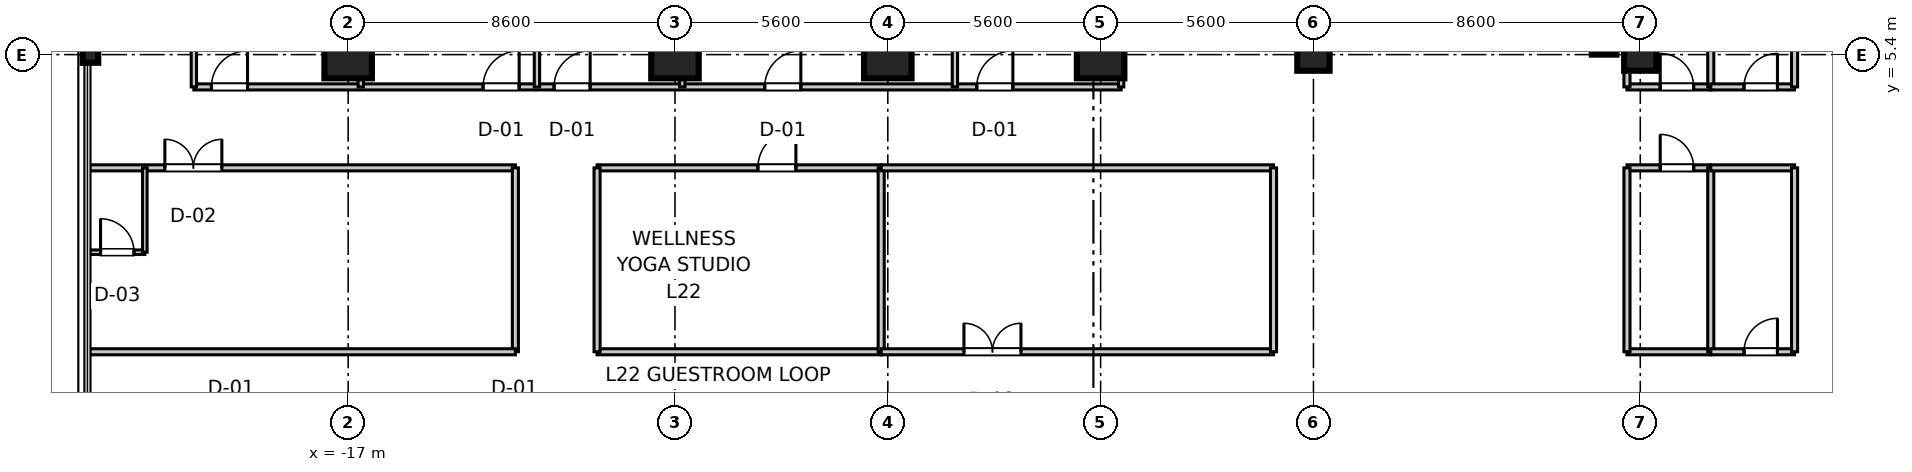
"""IFC4 building model, lengths in metres.
Left out: names, types, materials, properties, quantities, classifications, styles, units other than length and angle.
Written with IfcOpenShell. Run it as: python <this file> out.ifc"""

import sys

from ifc_helpers import new_model, si_unit, direction, frame, frame_2d, origin, origin_2d, place, context, subcontext, project, spatial, rectangle, i_section, extrude, source, transform, mapped, element, fill, save


model = new_model("IFC4")
c1 = context("Model", 3, precision=1e-05, world=origin(), true_north=direction((0.0, 1.0)))
c2 = subcontext(c1, "Body", "Model", "MODEL_VIEW")
j1 = project(units=[si_unit("LENGTHUNIT", "METRE"), si_unit("PLANEANGLEUNIT", "RADIAN")], contexts=[c1])
p1 = place(None, origin())
s1 = spatial("IfcSite", under=j1, at=p1, CompositionType="ELEMENT")
p2 = place(p1, origin())
s2 = spatial("IfcBuilding", under=s1, at=p2, CompositionType="ELEMENT")
p3 = place(p2, frame((0.0, 0.0, 91.95)))
s3 = spatial("IfcBuildingStorey", under=s2, at=p3, CompositionType="ELEMENT", Elevation=91.95)
m1 = source(origin(), c2, "Body", "SweptSolid", [
    extrude(rectangle(XDim=1.25, YDim=1.25, at=origin_2d()), origin(), (0.0, 0.0, 1.0), 3.605),
])
for number, where, z_axis, x_axis in (
    (1, (-17.0, 5.4, 0.0), (0.0, 0.0, 1.0), (1.0, 0.0, 0.0)),
    (2, (-8.4, 5.4, 0.0), (0.0, 0.0, 1.0), (1.0, 0.0, 0.0)),
    (3, (-2.8, 5.4, 0.0), (0.0, 0.0, 1.0), (1.0, 0.0, 0.0)),
    (4, (2.8, 5.4, 0.0), (0.0, 0.0, 1.0), (1.0, 0.0, 0.0)),
):
    element("IfcColumn", number, at=place(p3, frame(where, z_axis=z_axis, x_axis=x_axis)), inside=s3, PredefinedType="COLUMN", context=c2, shape_type="MappedRepresentation", body=[
        mapped(m1, transform((0.0, 0.0, 0.0), scale=1.0)),
    ])
m2 = source(origin(), c2, "Body", "SweptSolid", [
    extrude(rectangle(XDim=0.85, YDim=0.85, at=origin_2d()), origin(), (0.0, 0.0, 1.0), 3.605),
])
for number, where, z_axis, x_axis in (
    (5, (8.4, 5.4, 0.0), (0.0, 0.0, 1.0), (1.0, 0.0, 0.0)),
    (6, (17.0, 5.4, 0.0), (0.0, 0.0, 1.0), (1.0, 0.0, 0.0)),
):
    element("IfcColumn", number, at=place(p3, frame(where, z_axis=z_axis, x_axis=x_axis)), inside=s3, PredefinedType="PILASTER", context=c2, shape_type="MappedRepresentation", body=[
        mapped(m2, transform((0.0, 0.0, 0.0), scale=1.0)),
    ])
m3 = source(origin(), c2, "Body", "SweptSolid", [
    extrude(i_section(OverallWidth=0.409, OverallDepth=0.43, WebThickness=0.021, FlangeThickness=0.034, at=origin_2d()), origin(), (0.0, 0.0, 1.0), 3.605),
])
p4 = place(p3, frame((-23.78, 5.4, 0.0), z_axis=(0.0, 0.0, 1.0), x_axis=(1.0, 0.0, 0.0)))
e7 = element("IfcColumn", 7, at=p4, inside=s3, PredefinedType="COLUMN", context=c2, shape_type="MappedRepresentation", body=[
    mapped(m3, transform((0.0, 0.0, 0.0), scale=1.0)),
])
m4 = source(origin(), c2, "Body", "SweptSolid", [
    extrude(rectangle(XDim=11.6, YDim=0.65, at=frame_2d((5.8, 0.0))), origin(), (0.0, 0.0, 1.0), 3.38),
])
p5 = place(p3, frame((16.05, 5.4, 0.0), z_axis=(0.0, 0.0, 1.0), x_axis=(0.0, 1.0, 0.0)))
e8 = element("IfcWall", 8, at=p5, inside=s3, PredefinedType="SHEAR", context=c2, shape_type="MappedRepresentation", body=[
    mapped(m4, transform((0.0, 0.0, 0.0), scale=1.0)),
])
m5 = source(origin(), c2, "Body", "SweptSolid", [
    extrude(rectangle(XDim=2.205, YDim=0.16, at=frame_2d((1.103, 0.0))), origin(), (0.0, 0.0, 1.0), 2.72),
])
p6 = place(p3, frame((16.65, 4.55, 0.0), z_axis=(0.0, 0.0, 1.0), x_axis=(1.0, 0.0, 0.0)))
e9 = element("IfcWall", 9, at=p6, inside=s3, PredefinedType="PARTITIONING", context=c2, shape_type="MappedRepresentation", body=[
    mapped(m5, transform((0.0, 0.0, 0.0), scale=1.0)),
])
p7 = place(p6, frame((0.875, 0.0, 0.0)))
e10 = element("IfcOpeningElement", 10, at=p7, cuts=e9, PredefinedType="OPENING", context=c2, shape_type="SweptSolid", body=[
    extrude(rectangle(XDim=0.88, YDim=2.1, at=frame_2d((0.44, 1.05))), frame((0.0, 0.09, 0.0), z_axis=(0.0, -1.0, 0.0), x_axis=(1.0, 0.0, 0.0)), (0.0, 0.0, 1.0), 0.18),
])
m6 = source(origin(), c2, "Body", "SweptSolid", [
    extrude(rectangle(XDim=19.25, YDim=0.16, at=frame_2d((9.625, 0.0))), origin(), (0.0, 0.0, 1.0), 2.72),
])
for number, where, z_axis, x_axis in (
    (11, (16.65, 4.55, 0.0), (0.0, 0.0, 1.0), (0.0, 1.0, 0.0)),
    (12, (18.855, 4.55, 0.0), (0.0, 0.0, 1.0), (0.0, 1.0, 0.0)),
):
    element("IfcWall", number, at=place(p3, frame(where, z_axis=z_axis, x_axis=x_axis)), inside=s3, PredefinedType="PARTITIONING", context=c2, shape_type="MappedRepresentation", body=[
        mapped(m6, transform((0.0, 0.0, 0.0), scale=1.0)),
    ])
p8 = place(p3, frame((18.855, 4.55, 0.0), z_axis=(0.0, 0.0, 1.0), x_axis=(1.0, 0.0, 0.0)))
e13 = element("IfcWall", 13, at=p8, inside=s3, PredefinedType="PARTITIONING", context=c2, shape_type="MappedRepresentation", body=[
    mapped(m5, transform((0.0, 0.0, 0.0), scale=1.0)),
])
p9 = place(p8, frame((0.875, 0.0, 0.0)))
e14 = element("IfcOpeningElement", 14, at=p9, cuts=e13, PredefinedType="OPENING", context=c2, shape_type="SweptSolid", body=[
    extrude(rectangle(XDim=0.88, YDim=2.1, at=frame_2d((0.44, 1.05))), frame((0.0, 0.09, 0.0), z_axis=(0.0, -1.0, 0.0), x_axis=(1.0, 0.0, 0.0)), (0.0, 0.0, 1.0), 0.18),
])
m7 = source(origin(), c2, "Body", "SweptSolid", [
    extrude(rectangle(XDim=17.83, YDim=0.16, at=frame_2d((8.915, 0.0))), origin(), (0.0, 0.0, 1.0), 2.72),
])
p10 = place(p3, frame((21.06, 4.55, 0.0), z_axis=(0.0, 0.0, 1.0), x_axis=(0.0, 1.0, 0.0)))
e15 = element("IfcWall", 15, at=p10, inside=s3, PredefinedType="PARTITIONING", context=c2, shape_type="MappedRepresentation", body=[
    mapped(m7, transform((0.0, 0.0, 0.0), scale=1.0)),
])
m8 = source(origin(), c2, "Body", "SweptSolid", [
    extrude(rectangle(XDim=24.4, YDim=0.16, at=frame_2d((12.2, 0.0))), origin(), (0.0, 0.0, 1.0), 2.72),
])
p11 = place(p3, frame((-21.06, 4.55, 0.0), z_axis=(0.0, 0.0, 1.0), x_axis=(1.0, 0.0, 0.0)))
e16 = element("IfcWall", 16, at=p11, inside=s3, PredefinedType="PARTITIONING", context=c2, shape_type="MappedRepresentation", body=[
    mapped(m8, transform((0.0, 0.0, 0.0), scale=1.0)),
])
p12 = place(p11, frame((0.462, 0.0, 0.0)))
e17 = element("IfcOpeningElement", 17, at=p12, cuts=e16, PredefinedType="OPENING", context=c2, shape_type="SweptSolid", body=[
    extrude(rectangle(XDim=0.95, YDim=2.1, at=frame_2d((0.475, 1.05))), frame((0.0, 0.09, 0.0), z_axis=(0.0, -1.0, 0.0), x_axis=(1.0, 0.0, 0.0)), (0.0, 0.0, 1.0), 0.18),
])
p13 = place(p11, frame((7.61, 0.0, 0.0)))
e18 = element("IfcOpeningElement", 18, at=p13, cuts=e16, PredefinedType="OPENING", context=c2, shape_type="SweptSolid", body=[
    extrude(rectangle(XDim=0.95, YDim=2.1, at=frame_2d((0.475, 1.05))), frame((0.0, 0.09, 0.0), z_axis=(0.0, -1.0, 0.0), x_axis=(1.0, 0.0, 0.0)), (0.0, 0.0, 1.0), 0.18),
])
p14 = place(p11, frame((9.478, 0.0, 0.0)))
e19 = element("IfcOpeningElement", 19, at=p14, cuts=e16, PredefinedType="OPENING", context=c2, shape_type="SweptSolid", body=[
    extrude(rectangle(XDim=0.95, YDim=2.1, at=frame_2d((0.475, 1.05))), frame((0.0, 0.09, 0.0), z_axis=(0.0, -1.0, 0.0), x_axis=(1.0, 0.0, 0.0)), (0.0, 0.0, 1.0), 0.18),
])
p15 = place(p11, frame((15.022, 0.0, 0.0)))
e20 = element("IfcOpeningElement", 20, at=p15, cuts=e16, PredefinedType="OPENING", context=c2, shape_type="SweptSolid", body=[
    extrude(rectangle(XDim=0.95, YDim=2.1, at=frame_2d((0.475, 1.05))), frame((0.0, 0.09, 0.0), z_axis=(0.0, -1.0, 0.0), x_axis=(1.0, 0.0, 0.0)), (0.0, 0.0, 1.0), 0.18),
])
p16 = place(p11, frame((20.601, 0.0, 0.0)))
e21 = element("IfcOpeningElement", 21, at=p16, cuts=e16, PredefinedType="OPENING", context=c2, shape_type="SweptSolid", body=[
    extrude(rectangle(XDim=0.95, YDim=2.1, at=frame_2d((0.475, 1.05))), frame((0.0, 0.09, 0.0), z_axis=(0.0, -1.0, 0.0), x_axis=(1.0, 0.0, 0.0)), (0.0, 0.0, 1.0), 0.18),
])
m9 = source(origin(), c2, "Body", "SweptSolid", [
    extrude(rectangle(XDim=17.83, YDim=0.14, at=frame_2d((8.915, 0.0))), origin(), (0.0, 0.0, 1.0), 2.72),
])
p17 = place(p3, frame((-21.06, 4.55, 0.0), z_axis=(0.0, 0.0, 1.0), x_axis=(0.0, 1.0, 0.0)))
e22 = element("IfcWall", 22, at=p17, inside=s3, PredefinedType="PARTITIONING", context=c2, shape_type="MappedRepresentation", body=[
    mapped(m9, transform((0.0, 0.0, 0.0), scale=1.0)),
])
m10 = source(origin(), c2, "Body", "SweptSolid", [
    extrude(rectangle(XDim=19.25, YDim=0.14, at=frame_2d((9.625, 0.0))), origin(), (0.0, 0.0, 1.0), 2.72),
])
for number, where, z_axis, x_axis in (
    (23, (3.34, 4.55, 0.0), (0.0, 0.0, 1.0), (0.0, 1.0, 0.0)),
    (24, (-16.668, 4.55, 0.0), (0.0, 0.0, 1.0), (0.0, 1.0, 0.0)),
    (25, (-12.032, 4.55, 0.0), (0.0, 0.0, 1.0), (0.0, 1.0, 0.0)),
    (26, (-8.208, 4.55, 0.0), (0.0, 0.0, 1.0), (0.0, 1.0, 0.0)),
    (27, (-1.034, 4.55, 0.0), (0.0, 0.0, 1.0), (0.0, 1.0, 0.0)),
):
    element("IfcWall", number, at=place(p3, frame(where, z_axis=z_axis, x_axis=x_axis)), inside=s3, PredefinedType="PARTITIONING", context=c2, shape_type="MappedRepresentation", body=[
        mapped(m10, transform((0.0, 0.0, 0.0), scale=1.0)),
    ])
m11 = source(origin(), c2, "Body", "SweptSolid", [
    extrude(rectangle(XDim=11.2, YDim=0.16, at=frame_2d((5.6, 0.0))), origin(), (0.0, 0.0, 1.0), 2.72),
])
p18 = place(p3, frame((-23.8, 2.42, 0.0), z_axis=(0.0, 0.0, 1.0), x_axis=(1.0, 0.0, 0.0)))
e28 = element("IfcWall", 28, at=p18, inside=s3, PredefinedType="PARTITIONING", context=c2, shape_type="MappedRepresentation", body=[
    mapped(m11, transform((0.0, 0.0, 0.0), scale=1.0)),
])
p19 = place(p18, frame((1.977, 0.0, 0.0)))
e29 = element("IfcOpeningElement", 29, at=p19, cuts=e28, PredefinedType="OPENING", context=c2, shape_type="SweptSolid", body=[
    extrude(rectangle(XDim=1.5, YDim=2.15, at=frame_2d((0.75, 1.075))), frame((0.0, 0.09, 0.0), z_axis=(0.0, -1.0, 0.0), x_axis=(1.0, 0.0, 0.0)), (0.0, 0.0, 1.0), 0.18),
])
m12 = source(origin(), c2, "Body", "SweptSolid", [
    extrude(rectangle(XDim=4.84, YDim=0.16, at=frame_2d((2.42, 0.0))), origin(), (0.0, 0.0, 1.0), 2.72),
])
p20 = place(p3, frame((-12.6, -2.42, 0.0), z_axis=(0.0, 0.0, 1.0), x_axis=(0.0, 1.0, 0.0)))
e30 = element("IfcWall", 30, at=p20, inside=s3, PredefinedType="PARTITIONING", context=c2, shape_type="MappedRepresentation", body=[
    mapped(m12, transform((0.0, 0.0, 0.0), scale=1.0)),
])
p21 = place(p3, frame((-23.8, -2.42, 0.0), z_axis=(0.0, 0.0, 1.0), x_axis=(1.0, 0.0, 0.0)))
e31 = element("IfcWall", 31, at=p21, inside=s3, PredefinedType="PARTITIONING", context=c2, shape_type="MappedRepresentation", body=[
    mapped(m11, transform((0.0, 0.0, 0.0), scale=1.0)),
])
m13 = source(origin(), c2, "Body", "SweptSolid", [
    extrude(rectangle(XDim=1.45, YDim=0.12, at=frame_2d((0.725, 0.0))), origin(), (0.0, 0.0, 1.0), 2.72),
])
p22 = place(p3, frame((-23.8, 0.2, 0.0), z_axis=(0.0, 0.0, 1.0), x_axis=(1.0, 0.0, 0.0)))
e32 = element("IfcWall", 32, at=p22, inside=s3, PredefinedType="PARTITIONING", context=c2, shape_type="MappedRepresentation", body=[
    mapped(m13, transform((0.0, 0.0, 0.0), scale=1.0)),
])
p23 = place(p22, frame((0.285, 0.0, 0.0)))
e33 = element("IfcOpeningElement", 33, at=p23, cuts=e32, PredefinedType="OPENING", context=c2, shape_type="SweptSolid", body=[
    extrude(rectangle(XDim=0.88, YDim=2.1, at=frame_2d((0.44, 1.05))), frame((0.0, 0.07, 0.0), z_axis=(0.0, -1.0, 0.0), x_axis=(1.0, 0.0, 0.0)), (0.0, 0.0, 1.0), 0.14),
])
m14 = source(origin(), c2, "Body", "SweptSolid", [
    extrude(rectangle(XDim=2.22, YDim=0.12, at=frame_2d((1.11, 0.0))), origin(), (0.0, 0.0, 1.0), 2.72),
])
p24 = place(p3, frame((-22.35, 0.2, 0.0), z_axis=(0.0, 0.0, 1.0), x_axis=(0.0, 1.0, 0.0)))
e34 = element("IfcWall", 34, at=p24, inside=s3, PredefinedType="PARTITIONING", context=c2, shape_type="MappedRepresentation", body=[
    mapped(m14, transform((0.0, 0.0, 0.0), scale=1.0)),
])
m15 = source(origin(), c2, "Body", "SweptSolid", [
    extrude(rectangle(XDim=7.476, YDim=0.16, at=frame_2d((3.738, 0.0))), origin(), (0.0, 0.0, 1.0), 2.72),
])
p25 = place(p3, frame((-10.45, -2.42, 0.0), z_axis=(0.0, 0.0, 1.0), x_axis=(1.0, 0.0, 0.0)))
e35 = element("IfcWall", 35, at=p25, inside=s3, PredefinedType="PARTITIONING", context=c2, shape_type="MappedRepresentation", body=[
    mapped(m15, transform((0.0, 0.0, 0.0), scale=1.0)),
])
p26 = place(p3, frame((-10.45, 2.42, 0.0), z_axis=(0.0, 0.0, 1.0), x_axis=(1.0, 0.0, 0.0)))
e36 = element("IfcWall", 36, at=p26, inside=s3, PredefinedType="PARTITIONING", context=c2, shape_type="MappedRepresentation", body=[
    mapped(m15, transform((0.0, 0.0, 0.0), scale=1.0)),
])
p27 = place(p26, frame((4.232, 0.0, 0.0)))
e37 = element("IfcOpeningElement", 37, at=p27, cuts=e36, PredefinedType="OPENING", context=c2, shape_type="SweptSolid", body=[
    extrude(rectangle(XDim=1.0, YDim=2.1, at=frame_2d((0.5, 1.05))), frame((0.0, 0.09, 0.0), z_axis=(0.0, -1.0, 0.0), x_axis=(1.0, 0.0, 0.0)), (0.0, 0.0, 1.0), 0.18),
])
for number, where, z_axis, x_axis in (
    (38, (-10.45, -2.42, 0.0), (0.0, 0.0, 1.0), (0.0, 1.0, 0.0)),
    (39, (-2.974, -2.42, 0.0), (0.0, 0.0, 1.0), (0.0, 1.0, 0.0)),
):
    element("IfcWall", number, at=place(p3, frame(where, z_axis=z_axis, x_axis=x_axis)), inside=s3, PredefinedType="PARTITIONING", context=c2, shape_type="MappedRepresentation", body=[
        mapped(m12, transform((0.0, 0.0, 0.0), scale=1.0)),
    ])
m16 = source(origin(), c2, "Body", "SweptSolid", [
    extrude(rectangle(XDim=10.324, YDim=0.16, at=frame_2d((5.162, 0.0))), origin(), (0.0, 0.0, 1.0), 2.72),
])
p28 = place(p3, frame((-2.974, -2.42, 0.0), z_axis=(0.0, 0.0, 1.0), x_axis=(1.0, 0.0, 0.0)))
e40 = element("IfcWall", 40, at=p28, inside=s3, PredefinedType="PARTITIONING", context=c2, shape_type="MappedRepresentation", body=[
    mapped(m16, transform((0.0, 0.0, 0.0), scale=1.0)),
])
p29 = place(p28, frame((2.178, 0.0, 0.0)))
e41 = element("IfcOpeningElement", 41, at=p29, cuts=e40, PredefinedType="OPENING", context=c2, shape_type="SweptSolid", body=[
    extrude(rectangle(XDim=1.5, YDim=2.15, at=frame_2d((0.75, 1.075))), frame((0.0, 0.09, 0.0), z_axis=(0.0, -1.0, 0.0), x_axis=(1.0, 0.0, 0.0)), (0.0, 0.0, 1.0), 0.18),
])
p30 = place(p3, frame((-2.974, 2.42, 0.0), z_axis=(0.0, 0.0, 1.0), x_axis=(1.0, 0.0, 0.0)))
e42 = element("IfcWall", 42, at=p30, inside=s3, PredefinedType="PARTITIONING", context=c2, shape_type="MappedRepresentation", body=[
    mapped(m16, transform((0.0, 0.0, 0.0), scale=1.0)),
])
p31 = place(p3, frame((7.35, -2.42, 0.0), z_axis=(0.0, 0.0, 1.0), x_axis=(0.0, 1.0, 0.0)))
e43 = element("IfcWall", 43, at=p31, inside=s3, PredefinedType="PARTITIONING", context=c2, shape_type="MappedRepresentation", body=[
    mapped(m12, transform((0.0, 0.0, 0.0), scale=1.0)),
])
p32 = place(p3, frame((16.65, -2.42, 0.0), z_axis=(0.0, 0.0, 1.0), x_axis=(1.0, 0.0, 0.0)))
e44 = element("IfcWall", 44, at=p32, inside=s3, PredefinedType="PARTITIONING", context=c2, shape_type="MappedRepresentation", body=[
    mapped(m5, transform((0.0, 0.0, 0.0), scale=1.0)),
])
p33 = place(p3, frame((16.65, 2.42, 0.0), z_axis=(0.0, 0.0, 1.0), x_axis=(1.0, 0.0, 0.0)))
e45 = element("IfcWall", 45, at=p33, inside=s3, PredefinedType="PARTITIONING", context=c2, shape_type="MappedRepresentation", body=[
    mapped(m5, transform((0.0, 0.0, 0.0), scale=1.0)),
])
p34 = place(p33, frame((0.875, 0.0, 0.0)))
e46 = element("IfcOpeningElement", 46, at=p34, cuts=e45, PredefinedType="OPENING", context=c2, shape_type="SweptSolid", body=[
    extrude(rectangle(XDim=0.88, YDim=2.1, at=frame_2d((0.44, 1.05))), frame((0.0, 0.09, 0.0), z_axis=(0.0, -1.0, 0.0), x_axis=(1.0, 0.0, 0.0)), (0.0, 0.0, 1.0), 0.18),
])
for number, where, z_axis, x_axis in (
    (47, (16.65, -2.42, 0.0), (0.0, 0.0, 1.0), (0.0, 1.0, 0.0)),
    (48, (18.855, -2.42, 0.0), (0.0, 0.0, 1.0), (0.0, 1.0, 0.0)),
):
    element("IfcWall", number, at=place(p3, frame(where, z_axis=z_axis, x_axis=x_axis)), inside=s3, PredefinedType="PARTITIONING", context=c2, shape_type="MappedRepresentation", body=[
        mapped(m12, transform((0.0, 0.0, 0.0), scale=1.0)),
    ])
p35 = place(p3, frame((18.855, -2.42, 0.0), z_axis=(0.0, 0.0, 1.0), x_axis=(1.0, 0.0, 0.0)))
e49 = element("IfcWall", 49, at=p35, inside=s3, PredefinedType="PARTITIONING", context=c2, shape_type="MappedRepresentation", body=[
    mapped(m5, transform((0.0, 0.0, 0.0), scale=1.0)),
])
p36 = place(p35, frame((0.875, 0.0, 0.0)))
e50 = element("IfcOpeningElement", 50, at=p36, cuts=e49, PredefinedType="OPENING", context=c2, shape_type="SweptSolid", body=[
    extrude(rectangle(XDim=0.88, YDim=2.1, at=frame_2d((0.44, 1.05))), frame((0.0, 0.09, 0.0), z_axis=(0.0, -1.0, 0.0), x_axis=(1.0, 0.0, 0.0)), (0.0, 0.0, 1.0), 0.18),
])
p37 = place(p3, frame((18.855, 2.42, 0.0), z_axis=(0.0, 0.0, 1.0), x_axis=(1.0, 0.0, 0.0)))
e51 = element("IfcWall", 51, at=p37, inside=s3, PredefinedType="PARTITIONING", context=c2, shape_type="MappedRepresentation", body=[
    mapped(m5, transform((0.0, 0.0, 0.0), scale=1.0)),
])
p38 = place(p3, frame((21.06, -2.42, 0.0), z_axis=(0.0, 0.0, 1.0), x_axis=(0.0, 1.0, 0.0)))
e52 = element("IfcWall", 52, at=p38, inside=s3, PredefinedType="PARTITIONING", context=c2, shape_type="MappedRepresentation", body=[
    mapped(m12, transform((0.0, 0.0, 0.0), scale=1.0)),
])
m17 = source(origin(), c2, "Body", "SweptSolid", [
    extrude(rectangle(XDim=0.88, YDim=2.1, at=frame_2d((0.44, 1.05))), frame((0.0, 0.025, 0.0), z_axis=(0.0, -1.0, 0.0), x_axis=(1.0, 0.0, 0.0)), (0.0, 0.0, 1.0), 0.05),
])
p39 = place(p7, origin())
e53 = element("IfcDoor", 53, at=p39, inside=s3, OperationType="SINGLE_SWING_LEFT", PredefinedType="DOOR", context=c2, shape_type="MappedRepresentation", body=[
    mapped(m17, transform((0.0, 0.0, 0.0), scale=1.0)),
])
fill(e10, e53)
p40 = place(p9, origin())
e54 = element("IfcDoor", 54, at=p40, inside=s3, OperationType="SINGLE_SWING_RIGHT", PredefinedType="DOOR", context=c2, shape_type="MappedRepresentation", body=[
    mapped(m17, transform((0.0, 0.0, 0.0), scale=1.0)),
])
fill(e14, e54)
m18 = source(origin(), c2, "Body", "SweptSolid", [
    extrude(rectangle(XDim=0.95, YDim=2.1, at=frame_2d((0.475, 1.05))), frame((0.0, 0.025, 0.0), z_axis=(0.0, -1.0, 0.0), x_axis=(1.0, 0.0, 0.0)), (0.0, 0.0, 1.0), 0.05),
])
p41 = place(p12, origin())
e55 = element("IfcDoor", 55, at=p41, inside=s3, OperationType="SINGLE_SWING_RIGHT", PredefinedType="DOOR", context=c2, shape_type="MappedRepresentation", body=[
    mapped(m18, transform((0.0, 0.0, 0.0), scale=1.0)),
])
fill(e17, e55)
p42 = place(p13, origin())
e56 = element("IfcDoor", 56, at=p42, inside=s3, OperationType="SINGLE_SWING_RIGHT", PredefinedType="DOOR", context=c2, shape_type="MappedRepresentation", body=[
    mapped(m18, transform((0.0, 0.0, 0.0), scale=1.0)),
])
fill(e18, e56)
p43 = place(p14, origin())
e57 = element("IfcDoor", 57, at=p43, inside=s3, OperationType="SINGLE_SWING_RIGHT", PredefinedType="DOOR", context=c2, shape_type="MappedRepresentation", body=[
    mapped(m18, transform((0.0, 0.0, 0.0), scale=1.0)),
])
fill(e19, e57)
p44 = place(p15, origin())
e58 = element("IfcDoor", 58, at=p44, inside=s3, OperationType="SINGLE_SWING_RIGHT", PredefinedType="DOOR", context=c2, shape_type="MappedRepresentation", body=[
    mapped(m18, transform((0.0, 0.0, 0.0), scale=1.0)),
])
fill(e20, e58)
p45 = place(p16, origin())
e59 = element("IfcDoor", 59, at=p45, inside=s3, OperationType="SINGLE_SWING_RIGHT", PredefinedType="DOOR", context=c2, shape_type="MappedRepresentation", body=[
    mapped(m18, transform((0.0, 0.0, 0.0), scale=1.0)),
])
fill(e21, e59)
p46 = place(p23, origin())
e60 = element("IfcDoor", 60, at=p46, inside=s3, OperationType="SINGLE_SWING_LEFT", PredefinedType="DOOR", context=c2, shape_type="MappedRepresentation", body=[
    mapped(m17, transform((0.0, 0.0, 0.0), scale=1.0)),
])
fill(e33, e60)
m19 = source(origin(), c2, "Body", "SweptSolid", [
    extrude(rectangle(XDim=1.5, YDim=2.15, at=frame_2d((0.75, 1.075))), frame((0.0, 0.025, 0.0), z_axis=(0.0, -1.0, 0.0), x_axis=(1.0, 0.0, 0.0)), (0.0, 0.0, 1.0), 0.05),
])
p47 = place(p19, origin())
e61 = element("IfcDoor", 61, at=p47, inside=s3, OperationType="DOUBLE_DOOR_SINGLE_SWING", PredefinedType="DOOR", context=c2, shape_type="MappedRepresentation", body=[
    mapped(m19, transform((0.0, 0.0, 0.0), scale=1.0)),
])
fill(e29, e61)
m20 = source(origin(), c2, "Body", "SweptSolid", [
    extrude(rectangle(XDim=1.0, YDim=2.1, at=frame_2d((0.5, 1.05))), frame((0.0, 0.025, 0.0), z_axis=(0.0, -1.0, 0.0), x_axis=(1.0, 0.0, 0.0)), (0.0, 0.0, 1.0), 0.05),
])
p48 = place(p27, frame((1.0, 0.0, 0.0), z_axis=(0.0, 0.0, 1.0), x_axis=(-1.0, 0.0, 0.0)))
e62 = element("IfcDoor", 62, at=p48, inside=s3, OperationType="SINGLE_SWING_RIGHT", PredefinedType="DOOR", context=c2, shape_type="MappedRepresentation", body=[
    mapped(m20, transform((0.0, 0.0, 0.0), scale=1.0)),
])
fill(e37, e62)
p49 = place(p29, origin())
e63 = element("IfcDoor", 63, at=p49, inside=s3, OperationType="DOUBLE_DOOR_SINGLE_SWING", PredefinedType="DOOR", context=c2, shape_type="MappedRepresentation", body=[
    mapped(m19, transform((0.0, 0.0, 0.0), scale=1.0)),
])
fill(e41, e63)
p50 = place(p34, frame((0.88, 0.0, 0.0), z_axis=(0.0, 0.0, 1.0), x_axis=(-1.0, 0.0, 0.0)))
e64 = element("IfcDoor", 64, at=p50, inside=s3, OperationType="SINGLE_SWING_LEFT", PredefinedType="DOOR", context=c2, shape_type="MappedRepresentation", body=[
    mapped(m17, transform((0.0, 0.0, 0.0), scale=1.0)),
])
fill(e46, e64)
p51 = place(p36, origin())
e65 = element("IfcDoor", 65, at=p51, inside=s3, OperationType="SINGLE_SWING_RIGHT", PredefinedType="DOOR", context=c2, shape_type="MappedRepresentation", body=[
    mapped(m17, transform((0.0, 0.0, 0.0), scale=1.0)),
])
fill(e50, e65)
save(model, sys.argv[1])
